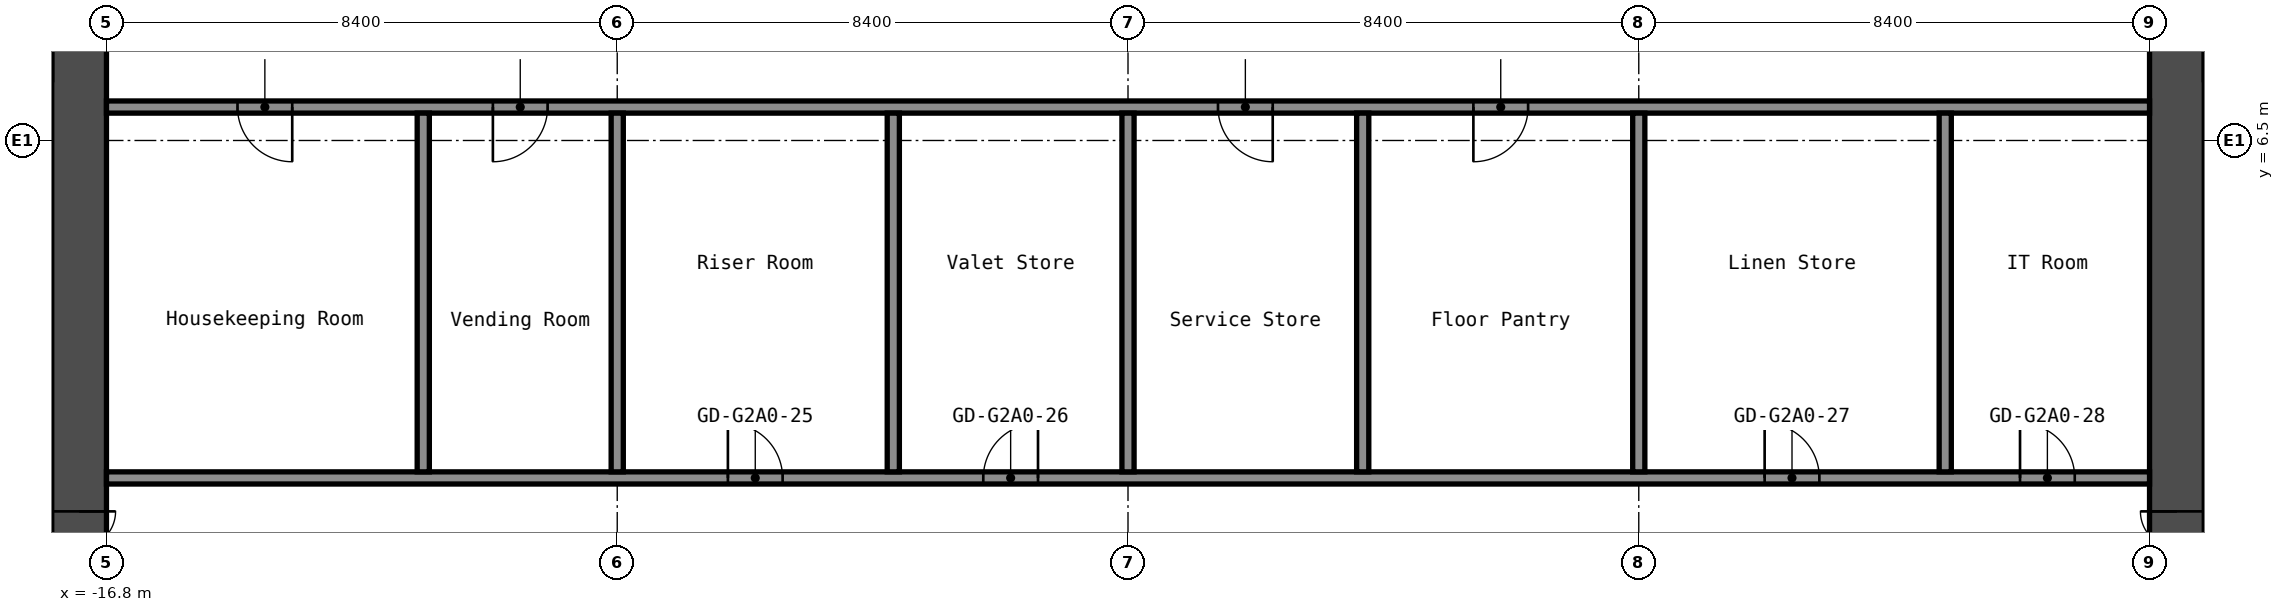
"""IFC4 building model, lengths in metres.
Left out: names, types, materials, properties, quantities, classifications, styles, units other than length and angle.
Written with IfcOpenShell. Run it as: python <this file> out.ifc"""

import sys

from ifc_helpers import new_model, si_unit, direction, frame, frame_2d, origin, place, context, subcontext, project, spatial, rectangle, extrude, element, fill, save


model = new_model("IFC4")
c1 = context("Model", 3, precision=1e-05, world=origin(), true_north=direction((0.0, 1.0)))
c2 = subcontext(c1, "Body", "Model", "MODEL_VIEW")
j1 = project(units=[si_unit("LENGTHUNIT", "METRE"), si_unit("PLANEANGLEUNIT", "RADIAN")], contexts=[c1])
p1 = place(None, origin())
s1 = spatial("IfcSite", under=j1, at=p1, CompositionType="ELEMENT")
p2 = place(p1, origin())
s2 = spatial("IfcBuilding", under=s1, at=p2, CompositionType="ELEMENT")
p3 = place(p2, frame((0.0, 0.0, 75.4)))
s3 = spatial("IfcBuildingStorey", under=s2, at=p3, CompositionType="ELEMENT", Elevation=75.4)
p4 = place(p3, frame((-17.25, -8.4, 0.0), z_axis=(0.0, 0.0, 1.0), x_axis=(0.0, 1.0, 0.0)))
e1 = element("IfcWall", 1, at=p4, inside=s3, PredefinedType="SHEAR", context=c2, shape_type="SweptSolid", body=[
    extrude(rectangle(XDim=16.8, YDim=0.9, at=frame_2d((8.4, 0.0))), origin(), (0.0, 0.0, 1.0), 2.8),
])
p5 = place(p4, frame((7.6, 0.0, 0.0)))
e2 = element("IfcOpeningElement", 2, at=p5, cuts=e1, PredefinedType="OPENING", context=c2, shape_type="SweptSolid", body=[
    extrude(rectangle(XDim=1.2, YDim=2.1, at=frame_2d((0.6, 1.05))), frame((0.0, 0.46, 0.0), z_axis=(0.0, -1.0, 0.0), x_axis=(1.0, 0.0, 0.0)), (0.0, 0.0, 1.0), 0.92),
])
p6 = place(p3, frame((-32.7, 7.95, 0.0), z_axis=(0.0, 0.0, 1.0), x_axis=(1.0, 0.0, 0.0)))
e3 = element("IfcWall", 3, at=p6, inside=s3, PredefinedType="SHEAR", context=c2, shape_type="SweptSolid", body=[
    extrude(rectangle(XDim=15.0, YDim=0.9, at=frame_2d((7.5, 0.0))), origin(), (0.0, 0.0, 1.0), 2.8),
])
p7 = place(p6, frame((3.4, 0.0, 0.0)))
e4 = element("IfcOpeningElement", 4, at=p7, cuts=e3, PredefinedType="OPENING", context=c2, shape_type="SweptSolid", body=[
    extrude(rectangle(XDim=1.2, YDim=2.1, at=frame_2d((0.6, 1.05))), frame((0.0, 0.46, 0.0), z_axis=(0.0, -1.0, 0.0), x_axis=(1.0, 0.0, 0.0)), (0.0, 0.0, 1.0), 0.92),
])
p8 = place(p6, frame((0.75, 0.0, 0.0)))
e5 = element("IfcOpeningElement", 5, at=p8, cuts=e3, PredefinedType="OPENING", context=c2, shape_type="SweptSolid", body=[
    extrude(rectangle(XDim=0.9, YDim=2.1, at=frame_2d((0.45, 1.05))), frame((0.0, 0.46, 0.0), z_axis=(0.0, -1.0, 0.0), x_axis=(1.0, 0.0, 0.0)), (0.0, 0.0, 1.0), 0.92),
])
p9 = place(p3, frame((17.25, -8.4, 0.0), z_axis=(0.0, 0.0, 1.0), x_axis=(0.0, 1.0, 0.0)))
e6 = element("IfcWall", 6, at=p9, inside=s3, PredefinedType="SHEAR", context=c2, shape_type="SweptSolid", body=[
    extrude(rectangle(XDim=16.8, YDim=0.9, at=frame_2d((8.4, 0.0))), origin(), (0.0, 0.0, 1.0), 2.8),
])
p10 = place(p9, frame((7.6, 0.0, 0.0)))
e7 = element("IfcOpeningElement", 7, at=p10, cuts=e6, PredefinedType="OPENING", context=c2, shape_type="SweptSolid", body=[
    extrude(rectangle(XDim=1.2, YDim=2.1, at=frame_2d((0.6, 1.05))), frame((0.0, 0.46, 0.0), z_axis=(0.0, -1.0, 0.0), x_axis=(1.0, 0.0, 0.0)), (0.0, 0.0, 1.0), 0.92),
])
p11 = place(p3, frame((17.7, 7.95, 0.0), z_axis=(0.0, 0.0, 1.0), x_axis=(1.0, 0.0, 0.0)))
e8 = element("IfcWall", 8, at=p11, inside=s3, PredefinedType="SHEAR", context=c2, shape_type="SweptSolid", body=[
    extrude(rectangle(XDim=15.0, YDim=0.9, at=frame_2d((7.5, 0.0))), origin(), (0.0, 0.0, 1.0), 2.8),
])
p12 = place(p11, frame((10.4, 0.0, 0.0)))
e9 = element("IfcOpeningElement", 9, at=p12, cuts=e8, PredefinedType="OPENING", context=c2, shape_type="SweptSolid", body=[
    extrude(rectangle(XDim=1.2, YDim=2.1, at=frame_2d((0.6, 1.05))), frame((0.0, 0.46, 0.0), z_axis=(0.0, -1.0, 0.0), x_axis=(1.0, 0.0, 0.0)), (0.0, 0.0, 1.0), 0.92),
])
p13 = place(p11, frame((13.35, 0.0, 0.0)))
e10 = element("IfcOpeningElement", 10, at=p13, cuts=e8, PredefinedType="OPENING", context=c2, shape_type="SweptSolid", body=[
    extrude(rectangle(XDim=0.9, YDim=2.1, at=frame_2d((0.45, 1.05))), frame((0.0, 0.46, 0.0), z_axis=(0.0, -1.0, 0.0), x_axis=(1.0, 0.0, 0.0)), (0.0, 0.0, 1.0), 0.92),
])
p14 = place(p3, frame((-16.8, 0.95, 0.0), z_axis=(0.0, 0.0, 1.0), x_axis=(1.0, 0.0, 0.0)))
e11 = element("IfcWall", 11, at=p14, inside=s3, PredefinedType="PARTITIONING", context=c2, shape_type="SweptSolid", body=[
    extrude(rectangle(XDim=33.6, YDim=0.2, at=frame_2d((16.8, 0.0))), origin(), (0.0, 0.0, 1.0), 2.8),
])
p15 = place(p14, frame((10.22, 0.0, 0.0)))
e12 = element("IfcOpeningElement", 12, at=p15, cuts=e11, PredefinedType="OPENING", context=c2, shape_type="SweptSolid", body=[
    extrude(rectangle(XDim=0.9, YDim=2.1, at=frame_2d((0.45, 1.05))), frame((0.0, 0.11, 0.0), z_axis=(0.0, -1.0, 0.0), x_axis=(1.0, 0.0, 0.0)), (0.0, 0.0, 1.0), 0.22),
])
p16 = place(p14, frame((14.42, 0.0, 0.0)))
e13 = element("IfcOpeningElement", 13, at=p16, cuts=e11, PredefinedType="OPENING", context=c2, shape_type="SweptSolid", body=[
    extrude(rectangle(XDim=0.9, YDim=2.1, at=frame_2d((0.45, 1.05))), frame((0.0, 0.11, 0.0), z_axis=(0.0, -1.0, 0.0), x_axis=(1.0, 0.0, 0.0)), (0.0, 0.0, 1.0), 0.22),
])
p17 = place(p14, frame((27.27, 0.0, 0.0)))
e14 = element("IfcOpeningElement", 14, at=p17, cuts=e11, PredefinedType="OPENING", context=c2, shape_type="SweptSolid", body=[
    extrude(rectangle(XDim=0.9, YDim=2.1, at=frame_2d((0.45, 1.05))), frame((0.0, 0.11, 0.0), z_axis=(0.0, -1.0, 0.0), x_axis=(1.0, 0.0, 0.0)), (0.0, 0.0, 1.0), 0.22),
])
p18 = place(p14, frame((31.47, 0.0, 0.0)))
e15 = element("IfcOpeningElement", 15, at=p18, cuts=e11, PredefinedType="OPENING", context=c2, shape_type="SweptSolid", body=[
    extrude(rectangle(XDim=0.9, YDim=2.1, at=frame_2d((0.45, 1.05))), frame((0.0, 0.11, 0.0), z_axis=(0.0, -1.0, 0.0), x_axis=(1.0, 0.0, 0.0)), (0.0, 0.0, 1.0), 0.22),
])
p19 = place(p3, frame((-16.8, 7.05, 0.0), z_axis=(0.0, 0.0, 1.0), x_axis=(1.0, 0.0, 0.0)))
e16 = element("IfcWall", 16, at=p19, inside=s3, PredefinedType="PARTITIONING", context=c2, shape_type="SweptSolid", body=[
    extrude(rectangle(XDim=33.6, YDim=0.2, at=frame_2d((16.8, 0.0))), origin(), (0.0, 0.0, 1.0), 2.8),
])
p20 = place(p19, frame((2.155, 0.0, 0.0)))
e17 = element("IfcOpeningElement", 17, at=p20, cuts=e16, PredefinedType="OPENING", context=c2, shape_type="SweptSolid", body=[
    extrude(rectangle(XDim=0.9, YDim=2.1, at=frame_2d((0.45, 1.05))), frame((0.0, 0.11, 0.0), z_axis=(0.0, -1.0, 0.0), x_axis=(1.0, 0.0, 0.0)), (0.0, 0.0, 1.0), 0.22),
])
p21 = place(p19, frame((6.355, 0.0, 0.0)))
e18 = element("IfcOpeningElement", 18, at=p21, cuts=e16, PredefinedType="OPENING", context=c2, shape_type="SweptSolid", body=[
    extrude(rectangle(XDim=0.9, YDim=2.1, at=frame_2d((0.45, 1.05))), frame((0.0, 0.11, 0.0), z_axis=(0.0, -1.0, 0.0), x_axis=(1.0, 0.0, 0.0)), (0.0, 0.0, 1.0), 0.22),
])
p22 = place(p19, frame((18.28, 0.0, 0.0)))
e19 = element("IfcOpeningElement", 19, at=p22, cuts=e16, PredefinedType="OPENING", context=c2, shape_type="SweptSolid", body=[
    extrude(rectangle(XDim=0.9, YDim=2.1, at=frame_2d((0.45, 1.05))), frame((0.0, 0.11, 0.0), z_axis=(0.0, -1.0, 0.0), x_axis=(1.0, 0.0, 0.0)), (0.0, 0.0, 1.0), 0.22),
])
p23 = place(p19, frame((22.48, 0.0, 0.0)))
e20 = element("IfcOpeningElement", 20, at=p23, cuts=e16, PredefinedType="OPENING", context=c2, shape_type="SweptSolid", body=[
    extrude(rectangle(XDim=0.9, YDim=2.1, at=frame_2d((0.45, 1.05))), frame((0.0, 0.11, 0.0), z_axis=(0.0, -1.0, 0.0), x_axis=(1.0, 0.0, 0.0)), (0.0, 0.0, 1.0), 0.22),
])
for number, where, z_axis, x_axis in (
    (21, (-11.59, 1.05, 0.0), (0.0, 0.0, 1.0), (0.0, 1.0, 0.0)),
    (22, (-8.4, 1.05, 0.0), (0.0, 0.0, 1.0), (0.0, 1.0, 0.0)),
    (23, (-3.86, 1.05, 0.0), (0.0, 0.0, 1.0), (0.0, 1.0, 0.0)),
    (24, (0.0, 1.05, 0.0), (0.0, 0.0, 1.0), (0.0, 1.0, 0.0)),
    (25, (3.86, 1.05, 0.0), (0.0, 0.0, 1.0), (0.0, 1.0, 0.0)),
    (26, (8.4, 1.05, 0.0), (0.0, 0.0, 1.0), (0.0, 1.0, 0.0)),
    (27, (13.44, 1.05, 0.0), (0.0, 0.0, 1.0), (0.0, 1.0, 0.0)),
):
    element("IfcWall", number, at=place(p3, frame(where, z_axis=z_axis, x_axis=x_axis)), inside=s3, PredefinedType="PARTITIONING", context=c2, shape_type="SweptSolid", body=[
        extrude(rectangle(XDim=5.9, YDim=0.2, at=frame_2d((2.95, 0.0))), origin(), (0.0, 0.0, 1.0), 2.8),
    ])
p24 = place(p5, origin())
e28 = element("IfcDoor", 28, at=p24, inside=s3, OperationType="DOUBLE_DOOR_SINGLE_SWING", PredefinedType="DOOR", context=c2, shape_type="SweptSolid", body=[
    extrude(rectangle(XDim=1.2, YDim=2.1, at=frame_2d((0.6, 1.05))), frame((0.0, 0.025, 0.0), z_axis=(0.0, -1.0, 0.0), x_axis=(1.0, 0.0, 0.0)), (0.0, 0.0, 1.0), 0.05),
])
fill(e2, e28)
p25 = place(p10, origin())
e29 = element("IfcDoor", 29, at=p25, inside=s3, OperationType="DOUBLE_DOOR_SINGLE_SWING", PredefinedType="DOOR", context=c2, shape_type="SweptSolid", body=[
    extrude(rectangle(XDim=1.2, YDim=2.1, at=frame_2d((0.6, 1.05))), frame((0.0, 0.025, 0.0), z_axis=(0.0, -1.0, 0.0), x_axis=(1.0, 0.0, 0.0)), (0.0, 0.0, 1.0), 0.05),
])
fill(e7, e29)
p26 = place(p15, origin())
e30 = element("IfcDoor", 30, at=p26, inside=s3, OperationType="SINGLE_SWING_RIGHT", PredefinedType="DOOR", context=c2, shape_type="SweptSolid", body=[
    extrude(rectangle(XDim=0.9, YDim=2.1, at=frame_2d((0.45, 1.05))), frame((0.0, 0.025, 0.0), z_axis=(0.0, -1.0, 0.0), x_axis=(1.0, 0.0, 0.0)), (0.0, 0.0, 1.0), 0.05),
])
fill(e12, e30)
p27 = place(p16, origin())
e31 = element("IfcDoor", 31, at=p27, inside=s3, OperationType="SINGLE_SWING_LEFT", PredefinedType="DOOR", context=c2, shape_type="SweptSolid", body=[
    extrude(rectangle(XDim=0.9, YDim=2.1, at=frame_2d((0.45, 1.05))), frame((0.0, 0.025, 0.0), z_axis=(0.0, -1.0, 0.0), x_axis=(1.0, 0.0, 0.0)), (0.0, 0.0, 1.0), 0.05),
])
fill(e13, e31)
p28 = place(p17, origin())
e32 = element("IfcDoor", 32, at=p28, inside=s3, OperationType="SINGLE_SWING_RIGHT", PredefinedType="DOOR", context=c2, shape_type="SweptSolid", body=[
    extrude(rectangle(XDim=0.9, YDim=2.1, at=frame_2d((0.45, 1.05))), frame((0.0, 0.025, 0.0), z_axis=(0.0, -1.0, 0.0), x_axis=(1.0, 0.0, 0.0)), (0.0, 0.0, 1.0), 0.05),
])
fill(e14, e32)
p29 = place(p18, origin())
e33 = element("IfcDoor", 33, at=p29, inside=s3, OperationType="SINGLE_SWING_RIGHT", PredefinedType="DOOR", context=c2, shape_type="SweptSolid", body=[
    extrude(rectangle(XDim=0.9, YDim=2.1, at=frame_2d((0.45, 1.05))), frame((0.0, 0.025, 0.0), z_axis=(0.0, -1.0, 0.0), x_axis=(1.0, 0.0, 0.0)), (0.0, 0.0, 1.0), 0.05),
])
fill(e15, e33)
p30 = place(p20, origin())
e34 = element("IfcDoor", 34, at=p30, inside=s3, OperationType="SINGLE_SWING_RIGHT", PredefinedType="DOOR", context=c2, shape_type="SweptSolid", body=[
    extrude(rectangle(XDim=0.9, YDim=2.1, at=frame_2d((0.45, 1.05))), frame((0.0, 0.025, 0.0), z_axis=(0.0, -1.0, 0.0), x_axis=(1.0, 0.0, 0.0)), (0.0, 0.0, 1.0), 0.05),
])
fill(e17, e34)
p31 = place(p21, origin())
e35 = element("IfcDoor", 35, at=p31, inside=s3, OperationType="SINGLE_SWING_LEFT", PredefinedType="DOOR", context=c2, shape_type="SweptSolid", body=[
    extrude(rectangle(XDim=0.9, YDim=2.1, at=frame_2d((0.45, 1.05))), frame((0.0, 0.025, 0.0), z_axis=(0.0, -1.0, 0.0), x_axis=(1.0, 0.0, 0.0)), (0.0, 0.0, 1.0), 0.05),
])
fill(e18, e35)
p32 = place(p22, origin())
e36 = element("IfcDoor", 36, at=p32, inside=s3, OperationType="SINGLE_SWING_RIGHT", PredefinedType="DOOR", context=c2, shape_type="SweptSolid", body=[
    extrude(rectangle(XDim=0.9, YDim=2.1, at=frame_2d((0.45, 1.05))), frame((0.0, 0.025, 0.0), z_axis=(0.0, -1.0, 0.0), x_axis=(1.0, 0.0, 0.0)), (0.0, 0.0, 1.0), 0.05),
])
fill(e19, e36)
p33 = place(p23, origin())
e37 = element("IfcDoor", 37, at=p33, inside=s3, OperationType="SINGLE_SWING_LEFT", PredefinedType="DOOR", context=c2, shape_type="SweptSolid", body=[
    extrude(rectangle(XDim=0.9, YDim=2.1, at=frame_2d((0.45, 1.05))), frame((0.0, 0.025, 0.0), z_axis=(0.0, -1.0, 0.0), x_axis=(1.0, 0.0, 0.0)), (0.0, 0.0, 1.0), 0.05),
])
fill(e20, e37)
save(model, sys.argv[1])
